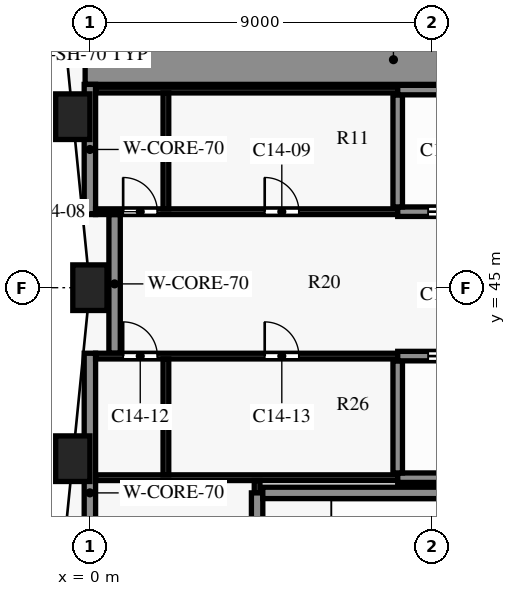
"""IFC4 building model, lengths in metres.
Left out: names, types, materials, properties, quantities, classifications, styles, units other than length and angle.
Written with IfcOpenShell. Run it as: python <this file> out.ifc"""

import sys

from ifc_helpers import new_model, si_unit, direction, frame, frame_2d, origin, origin_2d, place, context, subcontext, project, spatial, rectangle, extrude, element, fill, save


model = new_model("IFC4")
c1 = context("Model", 3, precision=1e-05, world=origin(), true_north=direction((0.0, 1.0)))
c2 = subcontext(c1, "Body", "Model", "MODEL_VIEW")
j1 = project(units=[si_unit("LENGTHUNIT", "METRE"), si_unit("PLANEANGLEUNIT", "RADIAN")], contexts=[c1])
p1 = place(None, origin())
s1 = spatial("IfcSite", under=j1, at=p1, CompositionType="ELEMENT")
p2 = place(p1, origin())
s2 = spatial("IfcBuilding", under=s1, at=p2, CompositionType="ELEMENT")
p3 = place(p2, frame((0.0, 0.0, 88.5)))
s3 = spatial("IfcBuildingStorey", under=s2, at=p3, CompositionType="ELEMENT", Elevation=88.5)
for number, where, z_axis, x_axis in (
    (1, (-0.45, 49.5, 0.0), (0.0, 0.0, 1.0), (0.1, -0.995, 0.0)),
    (2, (0.0, 45.0, 0.0), (0.0, 0.0, 1.0), (0.0, -1.0, 0.0)),
    (3, (-0.45, 40.5, 0.0), (0.0, 0.0, 1.0), (-0.1, -0.995, 0.0)),
):
    element("IfcColumn", number, at=place(p3, frame(where, z_axis=z_axis, x_axis=x_axis)), inside=s3, PredefinedType="COLUMN", context=c2, shape_type="SweptSolid", body=[
        extrude(rectangle(XDim=0.9, YDim=1.2, at=origin_2d()), origin(), (0.0, 0.0, 1.0), 3.8),
    ])
p4 = place(p3, frame((4.55, 39.6, 0.0), z_axis=(0.0, 0.0, 1.0), x_axis=(1.0, 0.0, 0.0)))
e4 = element("IfcWall", 4, at=p4, inside=s3, PredefinedType="SHEAR", context=c2, shape_type="SweptSolid", body=[
    extrude(rectangle(XDim=7.7, YDim=0.3, at=frame_2d((3.85, 0.0))), origin(), (0.0, 0.0, 1.0), 3.5),
])
p5 = place(p3, frame((0.15, 40.0, 0.0), z_axis=(0.0, 0.0, 1.0), x_axis=(1.0, 0.0, 0.0)))
e5 = element("IfcWall", 5, at=p5, inside=s3, PredefinedType="PARTITIONING", context=c2, shape_type="SweptSolid", body=[
    extrude(rectangle(XDim=7.95, YDim=0.15, at=frame_2d((3.975, 0.0))), origin(), (0.0, 0.0, 1.0), 3.5),
])
p6 = place(p3, frame((8.1, 40.0, 0.0), z_axis=(0.0, 0.0, 1.0), x_axis=(1.0, 0.0, 0.0)))
e6 = element("IfcWall", 6, at=p6, inside=s3, PredefinedType="SHEAR", context=c2, shape_type="SweptSolid", body=[
    extrude(rectangle(XDim=13.5, YDim=0.25, at=frame_2d((6.75, 0.0))), origin(), (0.0, 0.0, 1.0), 3.5),
])
p7 = place(p3, frame((0.15, 43.2, 0.0), z_axis=(0.0, 0.0, 1.0), x_axis=(1.0, 0.0, 0.0)))
e7 = element("IfcWall", 7, at=p7, inside=s3, PredefinedType="PARTITIONING", context=c2, shape_type="SweptSolid", body=[
    extrude(rectangle(XDim=7.95, YDim=0.15, at=frame_2d((3.975, 0.0))), origin(), (0.0, 0.0, 1.0), 3.5),
])
p8 = place(p7, frame((0.725, 0.0, 0.0)))
e8 = element("IfcOpeningElement", 8, at=p8, cuts=e7, PredefinedType="OPENING", context=c2, shape_type="SweptSolid", body=[
    extrude(rectangle(XDim=0.9, YDim=2.1, at=frame_2d((0.45, 1.05))), frame((0.0, 0.085, 0.0), z_axis=(0.0, -1.0, 0.0), x_axis=(1.0, 0.0, 0.0)), (0.0, 0.0, 1.0), 0.17),
])
p9 = place(p7, frame((4.45, 0.0, 0.0)))
e9 = element("IfcOpeningElement", 9, at=p9, cuts=e7, PredefinedType="OPENING", context=c2, shape_type="SweptSolid", body=[
    extrude(rectangle(XDim=0.9, YDim=2.1, at=frame_2d((0.45, 1.05))), frame((0.0, 0.085, 0.0), z_axis=(0.0, -1.0, 0.0), x_axis=(1.0, 0.0, 0.0)), (0.0, 0.0, 1.0), 0.17),
])
p10 = place(p3, frame((8.1, 43.2, 0.0), z_axis=(0.0, 0.0, 1.0), x_axis=(1.0, 0.0, 0.0)))
e10 = element("IfcWall", 10, at=p10, inside=s3, PredefinedType="SHEAR", context=c2, shape_type="SweptSolid", body=[
    extrude(rectangle(XDim=13.5, YDim=0.25, at=frame_2d((6.75, 0.0))), origin(), (0.0, 0.0, 1.0), 3.5),
])
p11 = place(p10, frame((0.8, 0.0, 0.0)))
e11 = element("IfcOpeningElement", 11, at=p11, cuts=e10, PredefinedType="OPENING", context=c2, shape_type="SweptSolid", body=[
    extrude(rectangle(XDim=1.1, YDim=2.1, at=frame_2d((0.55, 1.05))), frame((0.0, 0.135, 0.0), z_axis=(0.0, -1.0, 0.0), x_axis=(1.0, 0.0, 0.0)), (0.0, 0.0, 1.0), 0.27),
])
p12 = place(p10, frame((3.5, 0.0, 0.0)))
e12 = element("IfcOpeningElement", 12, at=p12, cuts=e10, PredefinedType="OPENING", context=c2, shape_type="SweptSolid", body=[
    extrude(rectangle(XDim=1.1, YDim=2.1, at=frame_2d((0.55, 1.05))), frame((0.0, 0.135, 0.0), z_axis=(0.0, -1.0, 0.0), x_axis=(1.0, 0.0, 0.0)), (0.0, 0.0, 1.0), 0.27),
])
p13 = place(p10, frame((6.2, 0.0, 0.0)))
e13 = element("IfcOpeningElement", 13, at=p13, cuts=e10, PredefinedType="OPENING", context=c2, shape_type="SweptSolid", body=[
    extrude(rectangle(XDim=1.1, YDim=2.1, at=frame_2d((0.55, 1.05))), frame((0.0, 0.135, 0.0), z_axis=(0.0, -1.0, 0.0), x_axis=(1.0, 0.0, 0.0)), (0.0, 0.0, 1.0), 0.27),
])
p14 = place(p10, frame((8.9, 0.0, 0.0)))
e14 = element("IfcOpeningElement", 14, at=p14, cuts=e10, PredefinedType="OPENING", context=c2, shape_type="SweptSolid", body=[
    extrude(rectangle(XDim=1.1, YDim=2.1, at=frame_2d((0.55, 1.05))), frame((0.0, 0.135, 0.0), z_axis=(0.0, -1.0, 0.0), x_axis=(1.0, 0.0, 0.0)), (0.0, 0.0, 1.0), 0.27),
])
p15 = place(p10, frame((11.6, 0.0, 0.0)))
e15 = element("IfcOpeningElement", 15, at=p15, cuts=e10, PredefinedType="OPENING", context=c2, shape_type="SweptSolid", body=[
    extrude(rectangle(XDim=1.1, YDim=2.1, at=frame_2d((0.55, 1.05))), frame((0.0, 0.135, 0.0), z_axis=(0.0, -1.0, 0.0), x_axis=(1.0, 0.0, 0.0)), (0.0, 0.0, 1.0), 0.27),
])
p16 = place(p3, frame((0.15, 47.0, 0.0), z_axis=(0.0, 0.0, 1.0), x_axis=(1.0, 0.0, 0.0)))
e16 = element("IfcWall", 16, at=p16, inside=s3, PredefinedType="PARTITIONING", context=c2, shape_type="SweptSolid", body=[
    extrude(rectangle(XDim=7.95, YDim=0.15, at=frame_2d((3.975, 0.0))), origin(), (0.0, 0.0, 1.0), 3.5),
])
p17 = place(p16, frame((0.725, 0.0, 0.0)))
e17 = element("IfcOpeningElement", 17, at=p17, cuts=e16, PredefinedType="OPENING", context=c2, shape_type="SweptSolid", body=[
    extrude(rectangle(XDim=0.9, YDim=2.1, at=frame_2d((0.45, 1.05))), frame((0.0, 0.085, 0.0), z_axis=(0.0, -1.0, 0.0), x_axis=(1.0, 0.0, 0.0)), (0.0, 0.0, 1.0), 0.17),
])
p18 = place(p16, frame((4.45, 0.0, 0.0)))
e18 = element("IfcOpeningElement", 18, at=p18, cuts=e16, PredefinedType="OPENING", context=c2, shape_type="SweptSolid", body=[
    extrude(rectangle(XDim=0.9, YDim=2.1, at=frame_2d((0.45, 1.05))), frame((0.0, 0.085, 0.0), z_axis=(0.0, -1.0, 0.0), x_axis=(1.0, 0.0, 0.0)), (0.0, 0.0, 1.0), 0.17),
])
p19 = place(p3, frame((8.1, 47.0, 0.0), z_axis=(0.0, 0.0, 1.0), x_axis=(1.0, 0.0, 0.0)))
e19 = element("IfcWall", 19, at=p19, inside=s3, PredefinedType="SHEAR", context=c2, shape_type="SweptSolid", body=[
    extrude(rectangle(XDim=8.1, YDim=0.25, at=frame_2d((4.05, 0.0))), origin(), (0.0, 0.0, 1.0), 3.5),
])
p20 = place(p19, frame((0.8, 0.0, 0.0)))
e20 = element("IfcOpeningElement", 20, at=p20, cuts=e19, PredefinedType="OPENING", context=c2, shape_type="SweptSolid", body=[
    extrude(rectangle(XDim=1.1, YDim=2.1, at=frame_2d((0.55, 1.05))), frame((0.0, 0.135, 0.0), z_axis=(0.0, -1.0, 0.0), x_axis=(1.0, 0.0, 0.0)), (0.0, 0.0, 1.0), 0.27),
])
p21 = place(p19, frame((3.5, 0.0, 0.0)))
e21 = element("IfcOpeningElement", 21, at=p21, cuts=e19, PredefinedType="OPENING", context=c2, shape_type="SweptSolid", body=[
    extrude(rectangle(XDim=1.1, YDim=2.1, at=frame_2d((0.55, 1.05))), frame((0.0, 0.135, 0.0), z_axis=(0.0, -1.0, 0.0), x_axis=(1.0, 0.0, 0.0)), (0.0, 0.0, 1.0), 0.27),
])
p22 = place(p19, frame((6.2, 0.0, 0.0)))
e22 = element("IfcOpeningElement", 22, at=p22, cuts=e19, PredefinedType="OPENING", context=c2, shape_type="SweptSolid", body=[
    extrude(rectangle(XDim=1.1, YDim=2.1, at=frame_2d((0.55, 1.05))), frame((0.0, 0.135, 0.0), z_axis=(0.0, -1.0, 0.0), x_axis=(1.0, 0.0, 0.0)), (0.0, 0.0, 1.0), 0.27),
])
p23 = place(p3, frame((0.15, 50.2, 0.0), z_axis=(0.0, 0.0, 1.0), x_axis=(1.0, 0.0, 0.0)))
e23 = element("IfcWall", 23, at=p23, inside=s3, PredefinedType="PARTITIONING", context=c2, shape_type="SweptSolid", body=[
    extrude(rectangle(XDim=7.95, YDim=0.15, at=frame_2d((3.975, 0.0))), origin(), (0.0, 0.0, 1.0), 3.5),
])
p24 = place(p3, frame((8.1, 50.2, 0.0), z_axis=(0.0, 0.0, 1.0), x_axis=(1.0, 0.0, 0.0)))
e24 = element("IfcWall", 24, at=p24, inside=s3, PredefinedType="SHEAR", context=c2, shape_type="SweptSolid", body=[
    extrude(rectangle(XDim=7.975, YDim=0.25, at=frame_2d((3.987, 0.0))), origin(), (0.0, 0.0, 1.0), 3.5),
])
p25 = place(p3, frame((-0.125, 51.0, 0.0), z_axis=(0.0, 0.0, 1.0), x_axis=(1.0, 0.0, 0.0)))
e25 = element("IfcWall", 25, at=p25, inside=s3, PredefinedType="SHEAR", context=c2, shape_type="SweptSolid", body=[
    extrude(rectangle(XDim=16.225, YDim=1.3, at=frame_2d((8.113, 0.0))), origin(), (0.0, 0.0, 1.0), 3.5),
])
p26 = place(p3, frame((0.0, 35.925, 0.0), z_axis=(0.0, 0.0, 1.0), x_axis=(0.0, 1.0, 0.0)))
e26 = element("IfcWall", 26, at=p26, inside=s3, PredefinedType="SHEAR", context=c2, shape_type="SweptSolid", body=[
    extrude(rectangle(XDim=7.35, YDim=0.3, at=frame_2d((3.675, 0.0))), origin(), (0.0, 0.0, 1.0), 3.5),
])
p27 = place(p3, frame((0.0, 46.925, 0.0), z_axis=(0.0, 0.0, 1.0), x_axis=(0.0, 1.0, 0.0)))
e27 = element("IfcWall", 27, at=p27, inside=s3, PredefinedType="SHEAR", context=c2, shape_type="SweptSolid", body=[
    extrude(rectangle(XDim=3.425, YDim=0.3, at=frame_2d((1.712, 0.0))), origin(), (0.0, 0.0, 1.0), 3.5),
])
p28 = place(p3, frame((0.65, 43.275, 0.0), z_axis=(0.0, 0.0, 1.0), x_axis=(0.0, 1.0, 0.0)))
e28 = element("IfcWall", 28, at=p28, inside=s3, PredefinedType="SHEAR", context=c2, shape_type="SweptSolid", body=[
    extrude(rectangle(XDim=3.65, YDim=0.3, at=frame_2d((1.825, 0.0))), origin(), (0.0, 0.0, 1.0), 3.5),
])
for number, where, z_axis, x_axis in (
    (29, (2.0, 40.075, 0.0), (0.0, 0.0, 1.0), (0.0, 1.0, 0.0)),
    (30, (2.0, 47.075, 0.0), (0.0, 0.0, 1.0), (0.0, 1.0, 0.0)),
):
    element("IfcWall", number, at=place(p3, frame(where, z_axis=z_axis, x_axis=x_axis)), inside=s3, PredefinedType="PARTITIONING", context=c2, shape_type="SweptSolid", body=[
        extrude(rectangle(XDim=3.05, YDim=0.15, at=frame_2d((1.525, 0.0))), origin(), (0.0, 0.0, 1.0), 3.5),
    ])
p29 = place(p3, frame((4.4, 39.6, 0.0), z_axis=(0.0, 0.0, 1.0), x_axis=(0.0, 1.0, 0.0)))
e31 = element("IfcWall", 31, at=p29, inside=s3, PredefinedType="PARTITIONING", context=c2, shape_type="SweptSolid", body=[
    extrude(rectangle(XDim=0.325, YDim=0.15, at=frame_2d((0.163, 0.0))), origin(), (0.0, 0.0, 1.0), 3.5),
])
p30 = place(p3, frame((4.4, 36.15, 0.0), z_axis=(0.0, 0.0, 1.0), x_axis=(0.0, 1.0, 0.0)))
e32 = element("IfcWall", 32, at=p30, inside=s3, PredefinedType="SHEAR", context=c2, shape_type="SweptSolid", body=[
    extrude(rectangle(XDim=3.45, YDim=0.3, at=frame_2d((1.725, 0.0))), origin(), (0.0, 0.0, 1.0), 3.5),
])
for number, where, z_axis, x_axis in (
    (33, (8.1, 40.125, 0.0), (0.0, 0.0, 1.0), (0.0, 1.0, 0.0)),
    (34, (8.1, 47.125, 0.0), (0.0, 0.0, 1.0), (0.0, 1.0, 0.0)),
):
    element("IfcWall", number, at=place(p3, frame(where, z_axis=z_axis, x_axis=x_axis)), inside=s3, PredefinedType="SHEAR", context=c2, shape_type="SweptSolid", body=[
        extrude(rectangle(XDim=2.95, YDim=0.25, at=frame_2d((1.475, 0.0))), origin(), (0.0, 0.0, 1.0), 3.5),
    ])
p31 = place(p17, origin())
e35 = element("IfcDoor", 35, at=p31, inside=s3, OperationType="SINGLE_SWING_RIGHT", PredefinedType="DOOR", context=c2, shape_type="SweptSolid", body=[
    extrude(rectangle(XDim=0.9, YDim=2.1, at=frame_2d((0.45, 1.05))), frame((0.0, 0.025, 0.0), z_axis=(0.0, -1.0, 0.0), x_axis=(1.0, 0.0, 0.0)), (0.0, 0.0, 1.0), 0.05),
])
fill(e17, e35)
p32 = place(p18, origin())
e36 = element("IfcDoor", 36, at=p32, inside=s3, OperationType="SINGLE_SWING_LEFT", PredefinedType="DOOR", context=c2, shape_type="SweptSolid", body=[
    extrude(rectangle(XDim=0.9, YDim=2.1, at=frame_2d((0.45, 1.05))), frame((0.0, 0.025, 0.0), z_axis=(0.0, -1.0, 0.0), x_axis=(1.0, 0.0, 0.0)), (0.0, 0.0, 1.0), 0.05),
])
fill(e18, e36)
p33 = place(p8, origin())
e37 = element("IfcDoor", 37, at=p33, inside=s3, OperationType="SINGLE_SWING_LEFT", PredefinedType="DOOR", context=c2, shape_type="SweptSolid", body=[
    extrude(rectangle(XDim=0.9, YDim=2.1, at=frame_2d((0.45, 1.05))), frame((0.0, 0.025, 0.0), z_axis=(0.0, -1.0, 0.0), x_axis=(1.0, 0.0, 0.0)), (0.0, 0.0, 1.0), 0.05),
])
fill(e8, e37)
p34 = place(p9, origin())
e38 = element("IfcDoor", 38, at=p34, inside=s3, OperationType="SINGLE_SWING_RIGHT", PredefinedType="DOOR", context=c2, shape_type="SweptSolid", body=[
    extrude(rectangle(XDim=0.9, YDim=2.1, at=frame_2d((0.45, 1.05))), frame((0.0, 0.025, 0.0), z_axis=(0.0, -1.0, 0.0), x_axis=(1.0, 0.0, 0.0)), (0.0, 0.0, 1.0), 0.05),
])
fill(e9, e38)
p35 = place(p11, origin())
e39 = element("IfcDoor", 39, at=p35, inside=s3, OperationType="DOUBLE_DOOR_SLIDING", PredefinedType="DOOR", context=c2, shape_type="SweptSolid", body=[
    extrude(rectangle(XDim=1.1, YDim=2.1, at=frame_2d((0.55, 1.05))), frame((0.0, 0.025, 0.0), z_axis=(0.0, -1.0, 0.0), x_axis=(1.0, 0.0, 0.0)), (0.0, 0.0, 1.0), 0.05),
])
fill(e11, e39)
p36 = place(p20, origin())
e40 = element("IfcDoor", 40, at=p36, inside=s3, OperationType="DOUBLE_DOOR_SLIDING", PredefinedType="DOOR", context=c2, shape_type="SweptSolid", body=[
    extrude(rectangle(XDim=1.1, YDim=2.1, at=frame_2d((0.55, 1.05))), frame((0.0, 0.025, 0.0), z_axis=(0.0, -1.0, 0.0), x_axis=(1.0, 0.0, 0.0)), (0.0, 0.0, 1.0), 0.05),
])
fill(e20, e40)
save(model, sys.argv[1])
